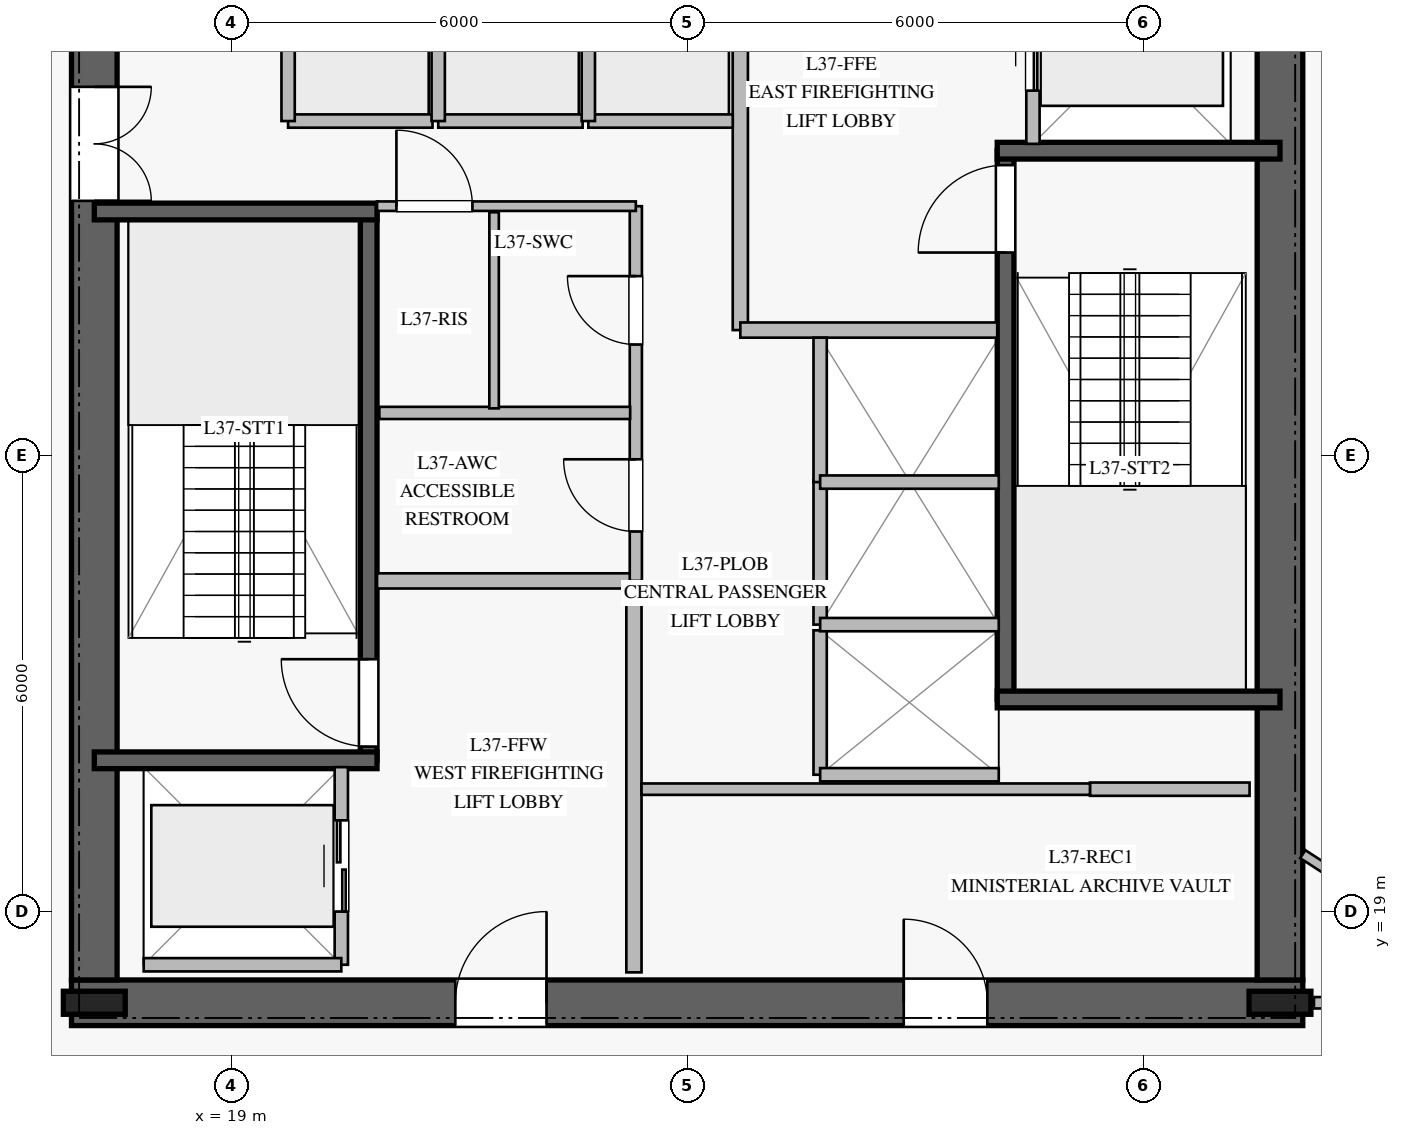
"""IFC4 building model, lengths in metres.
Left out: names, types, materials, properties, quantities, classifications, styles, units other than length and angle.
Written with IfcOpenShell. Run it as: python <this file> out.ifc"""

import sys

from ifc_helpers import new_model, si_unit, direction, frame, frame_2d, origin, origin_2d, place, context, subcontext, project, spatial, rectangle, i_section, extrude, element, fill, save


model = new_model("IFC4")
c1 = context("Model", 3, precision=1e-05, world=origin(), true_north=direction((0.0, 1.0)))
c2 = subcontext(c1, "Body", "Model", "MODEL_VIEW")
j1 = project(units=[si_unit("LENGTHUNIT", "METRE"), si_unit("PLANEANGLEUNIT", "RADIAN")], contexts=[c1])
p1 = place(None, origin())
s1 = spatial("IfcSite", under=j1, at=p1, CompositionType="ELEMENT")
p2 = place(p1, origin())
s2 = spatial("IfcBuilding", under=s1, at=p2, CompositionType="ELEMENT")
p3 = place(p2, frame((0.0, 0.0, 154.4)))
s3 = spatial("IfcBuildingStorey", under=s2, at=p3, CompositionType="ELEMENT", Elevation=154.4)
p4 = place(p3, frame((16.9, 17.8, 0.0), z_axis=(0.0, 0.0, 1.0), x_axis=(1.0, 0.0, 0.0)))
e1 = element("IfcWall", 1, at=p4, inside=s3, PredefinedType="SHEAR", context=c2, shape_type="SweptSolid", body=[
    extrude(rectangle(XDim=16.2, YDim=0.6, at=frame_2d((8.1, 0.0))), origin(), (0.0, 0.0, 1.0), 3.76),
])
p5 = place(p4, frame((5.05, 0.0, 0.0)))
e2 = element("IfcOpeningElement", 2, at=p5, cuts=e1, PredefinedType="OPENING", context=c2, shape_type="SweptSolid", body=[
    extrude(rectangle(XDim=1.2, YDim=2.25, at=frame_2d((0.6, 1.125))), frame((0.0, 0.31, 0.0), z_axis=(0.0, -1.0, 0.0), x_axis=(1.0, 0.0, 0.0)), (0.0, 0.0, 1.0), 0.62),
])
p6 = place(p4, frame((10.95, 0.0, 0.0)))
e3 = element("IfcOpeningElement", 3, at=p6, cuts=e1, PredefinedType="OPENING", context=c2, shape_type="SweptSolid", body=[
    extrude(rectangle(XDim=1.1, YDim=2.2, at=frame_2d((0.55, 1.1))), frame((0.0, 0.31, 0.0), z_axis=(0.0, -1.0, 0.0), x_axis=(1.0, 0.0, 0.0)), (0.0, 0.0, 1.0), 0.62),
])
p7 = place(p3, frame((17.2, 31.9, 0.0), z_axis=(0.0, 0.0, 1.0), x_axis=(0.0, -1.0, 0.0)))
e4 = element("IfcWall", 4, at=p7, inside=s3, PredefinedType="SHEAR", context=c2, shape_type="SweptSolid", body=[
    extrude(rectangle(XDim=13.8, YDim=0.6, at=frame_2d((6.9, 0.0))), origin(), (0.0, 0.0, 1.0), 3.76),
])
p8 = place(p7, frame((2.05, 0.0, 0.0)))
e5 = element("IfcOpeningElement", 5, at=p8, cuts=e4, PredefinedType="OPENING", context=c2, shape_type="SweptSolid", body=[
    extrude(rectangle(XDim=1.5, YDim=2.2, at=frame_2d((0.75, 1.1))), frame((0.0, 0.31, 0.0), z_axis=(0.0, -1.0, 0.0), x_axis=(1.0, 0.0, 0.0)), (0.0, 0.0, 1.0), 0.62),
])
p9 = place(p3, frame((32.8, 18.1, 0.0), z_axis=(0.0, 0.0, 1.0), x_axis=(0.0, 1.0, 0.0)))
e6 = element("IfcWall", 6, at=p9, inside=s3, PredefinedType="SHEAR", context=c2, shape_type="SweptSolid", body=[
    extrude(rectangle(XDim=13.8, YDim=0.6, at=frame_2d((6.9, 0.0))), origin(), (0.0, 0.0, 1.0), 3.76),
])
for number, where, z_axis, x_axis in (
    (7, (17.2, 17.8, 0.0), (0.0, 0.0, 1.0), (1.0, 0.0, 0.0)),
    (8, (32.8, 17.8, 0.0), (0.0, 0.0, 1.0), (1.0, 0.0, 0.0)),
):
    element("IfcColumn", number, at=place(p3, frame(where, z_axis=z_axis, x_axis=x_axis)), inside=s3, PredefinedType="COLUMN", context=c2, shape_type="SweptSolid", body=[
        extrude(i_section(OverallWidth=0.303, OverallDepth=0.814, WebThickness=0.021, FlangeThickness=0.04, at=origin_2d()), origin(), (0.0, 0.0, 1.0), 4.0),
    ])
p10 = place(p3, frame((20.81, 20.99, 0.0), z_axis=(0.0, 0.0, 1.0), x_axis=(0.0, 1.0, 0.0)))
e9 = element("IfcWall", 9, at=p10, inside=s3, PredefinedType="SOLIDWALL", context=c2, shape_type="SweptSolid", body=[
    extrude(rectangle(XDim=7.22, YDim=0.22, at=frame_2d((3.61, 0.0))), origin(), (0.0, 0.0, 1.0), 3.76),
])
p11 = place(p10, frame((0.18, 0.0, 0.0)))
e10 = element("IfcOpeningElement", 10, at=p11, cuts=e9, PredefinedType="OPENING", context=c2, shape_type="SweptSolid", body=[
    extrude(rectangle(XDim=1.15, YDim=2.2, at=frame_2d((0.575, 1.1))), frame((0.0, 0.12, 0.0), z_axis=(0.0, -1.0, 0.0), x_axis=(1.0, 0.0, 0.0)), (0.0, 0.0, 1.0), 0.24),
])
for number, where, z_axis, x_axis in (
    (11, (17.2, 20.99, 0.0), (0.0, 0.0, 1.0), (1.0, 0.0, 0.0)),
    (12, (17.2, 28.21, 0.0), (0.0, 0.0, 1.0), (1.0, 0.0, 0.0)),
):
    element("IfcWall", number, at=place(p3, frame(where, z_axis=z_axis, x_axis=x_axis)), inside=s3, PredefinedType="SOLIDWALL", context=c2, shape_type="SweptSolid", body=[
        extrude(rectangle(XDim=3.72, YDim=0.22, at=frame_2d((1.86, 0.0))), origin(), (0.0, 0.0, 1.0), 3.76),
    ])
p12 = place(p3, frame((29.19, 21.79, 0.0), z_axis=(0.0, 0.0, 1.0), x_axis=(0.0, 1.0, 0.0)))
e13 = element("IfcWall", 13, at=p12, inside=s3, PredefinedType="SOLIDWALL", context=c2, shape_type="SweptSolid", body=[
    extrude(rectangle(XDim=7.22, YDim=0.22, at=frame_2d((3.61, 0.0))), origin(), (0.0, 0.0, 1.0), 3.76),
])
p13 = place(p12, frame((5.88, 0.0, 0.0)))
e14 = element("IfcOpeningElement", 14, at=p13, cuts=e13, PredefinedType="OPENING", context=c2, shape_type="SweptSolid", body=[
    extrude(rectangle(XDim=1.15, YDim=2.2, at=frame_2d((0.575, 1.1))), frame((0.0, 0.12, 0.0), z_axis=(0.0, -1.0, 0.0), x_axis=(1.0, 0.0, 0.0)), (0.0, 0.0, 1.0), 0.24),
])
for number, where, z_axis, x_axis in (
    (15, (29.08, 21.79, 0.0), (0.0, 0.0, 1.0), (1.0, 0.0, 0.0)),
    (16, (29.08, 29.01, 0.0), (0.0, 0.0, 1.0), (1.0, 0.0, 0.0)),
):
    element("IfcWall", number, at=place(p3, frame(where, z_axis=z_axis, x_axis=x_axis)), inside=s3, PredefinedType="SOLIDWALL", context=c2, shape_type="SweptSolid", body=[
        extrude(rectangle(XDim=3.72, YDim=0.22, at=frame_2d((1.86, 0.0))), origin(), (0.0, 0.0, 1.0), 3.76),
    ])
p14 = place(p3, frame((24.3, 18.2, 0.0), z_axis=(0.0, 0.0, 1.0), x_axis=(0.0, 1.0, 0.0)))
e17 = element("IfcWall", 17, at=p14, inside=s3, PredefinedType="PARTITIONING", context=c2, shape_type="SweptSolid", body=[
    extrude(rectangle(XDim=5.15, YDim=0.2, at=frame_2d((2.575, 0.0))), origin(), (0.0, 0.0, 1.0), 3.76),
])
p15 = place(p3, frame((20.92, 23.35, 0.0), z_axis=(0.0, 0.0, 1.0), x_axis=(1.0, 0.0, 0.0)))
e18 = element("IfcWall", 18, at=p15, inside=s3, PredefinedType="PARTITIONING", context=c2, shape_type="SweptSolid", body=[
    extrude(rectangle(XDim=3.38, YDim=0.2, at=frame_2d((1.69, 0.0))), origin(), (0.0, 0.0, 1.0), 3.76),
])
p16 = place(p3, frame((25.7, 26.65, 0.0), z_axis=(0.0, 0.0, 1.0), x_axis=(0.0, 1.0, 0.0)))
e19 = element("IfcWall", 19, at=p16, inside=s3, PredefinedType="PARTITIONING", context=c2, shape_type="SweptSolid", body=[
    extrude(rectangle(XDim=5.15, YDim=0.2, at=frame_2d((2.575, 0.0))), origin(), (0.0, 0.0, 1.0), 3.76),
])
p17 = place(p3, frame((25.7, 26.65, 0.0), z_axis=(0.0, 0.0, 1.0), x_axis=(1.0, 0.0, 0.0)))
e20 = element("IfcWall", 20, at=p17, inside=s3, PredefinedType="PARTITIONING", context=c2, shape_type="SweptSolid", body=[
    extrude(rectangle(XDim=3.38, YDim=0.2, at=frame_2d((1.69, 0.0))), origin(), (0.0, 0.0, 1.0), 3.76),
])
p18 = place(p3, frame((24.325, 23.35, 0.0), z_axis=(0.0, 0.0, 1.0), x_axis=(0.0, 1.0, 0.0)))
e21 = element("IfcWall", 21, at=p18, inside=s3, PredefinedType="PLUMBINGWALL", context=c2, shape_type="SweptSolid", body=[
    extrude(rectangle(XDim=4.93, YDim=0.16, at=frame_2d((2.465, 0.0))), origin(), (0.0, 0.0, 1.0), 3.76),
])
p19 = place(p18, frame((0.65, 0.0, 0.0)))
e22 = element("IfcOpeningElement", 22, at=p19, cuts=e21, PredefinedType="OPENING", context=c2, shape_type="SweptSolid", body=[
    extrude(rectangle(XDim=0.95, YDim=2.1, at=frame_2d((0.475, 1.05))), frame((0.0, 0.09, 0.0), z_axis=(0.0, -1.0, 0.0), x_axis=(1.0, 0.0, 0.0)), (0.0, 0.0, 1.0), 0.18),
])
p20 = place(p18, frame((3.11, 0.0, 0.0)))
e23 = element("IfcOpeningElement", 23, at=p20, cuts=e21, PredefinedType="OPENING", context=c2, shape_type="SweptSolid", body=[
    extrude(rectangle(XDim=0.9, YDim=2.1, at=frame_2d((0.45, 1.05))), frame((0.0, 0.09, 0.0), z_axis=(0.0, -1.0, 0.0), x_axis=(1.0, 0.0, 0.0)), (0.0, 0.0, 1.0), 0.18),
])
p21 = place(p3, frame((20.92, 28.28, 0.0), z_axis=(0.0, 0.0, 1.0), x_axis=(1.0, 0.0, 0.0)))
e24 = element("IfcWall", 24, at=p21, inside=s3, PredefinedType="PARTITIONING", context=c2, shape_type="SweptSolid", body=[
    extrude(rectangle(XDim=3.405, YDim=0.125, at=frame_2d((1.703, 0.0))), origin(), (0.0, 0.0, 1.0), 3.76),
])
p22 = place(p21, frame((0.255, 0.0, 0.0)))
e25 = element("IfcOpeningElement", 25, at=p22, cuts=e24, PredefinedType="OPENING", context=c2, shape_type="SweptSolid", body=[
    extrude(rectangle(XDim=1.0, YDim=2.15, at=frame_2d((0.5, 1.075))), frame((0.0, 0.073, 0.0), z_axis=(0.0, -1.0, 0.0), x_axis=(1.0, 0.0, 0.0)), (0.0, 0.0, 1.0), 0.145),
])
p23 = place(p3, frame((20.95, 25.56, 0.0), z_axis=(0.0, 0.0, 1.0), x_axis=(1.0, 0.0, 0.0)))
e26 = element("IfcWall", 26, at=p23, inside=s3, PredefinedType="PLUMBINGWALL", context=c2, shape_type="SweptSolid", body=[
    extrude(rectangle(XDim=3.3, YDim=0.16, at=frame_2d((1.65, 0.0))), origin(), (0.0, 0.0, 1.0), 3.76),
])
p24 = place(p3, frame((22.46, 25.62, 0.0), z_axis=(0.0, 0.0, 1.0), x_axis=(0.0, 1.0, 0.0)))
e27 = element("IfcWall", 27, at=p24, inside=s3, PredefinedType="PARTITIONING", context=c2, shape_type="SweptSolid", body=[
    extrude(rectangle(XDim=2.58, YDim=0.125, at=frame_2d((1.29, 0.0))), origin(), (0.0, 0.0, 1.0), 3.76),
])
p25 = place(p3, frame((30.3, 20.61, 0.0), z_axis=(0.0, 0.0, 1.0), x_axis=(1.0, 0.0, 0.0)))
e28 = element("IfcWall", 28, at=p25, inside=s3, PredefinedType="PARTITIONING", context=c2, shape_type="SweptSolid", body=[
    extrude(rectangle(XDim=2.1, YDim=0.175, at=frame_2d((1.05, 0.0))), origin(), (0.0, 0.0, 1.0), 3.76),
])
p26 = place(p3, frame((24.4, 20.61, 0.0), z_axis=(0.0, 0.0, 1.0), x_axis=(1.0, 0.0, 0.0)))
e29 = element("IfcWall", 29, at=p26, inside=s3, PredefinedType="PARTITIONING", context=c2, shape_type="SweptSolid", body=[
    extrude(rectangle(XDim=5.9, YDim=0.15, at=frame_2d((2.95, 0.0))), origin(), (0.0, 0.0, 1.0), 3.76),
])
p27 = place(p3, frame((19.75, 29.4, 0.0), z_axis=(0.0, 0.0, 1.0), x_axis=(1.0, 0.0, 0.0)))
e30 = element("IfcWall", 30, at=p27, inside=s3, PredefinedType="PARTITIONING", context=c2, shape_type="SweptSolid", body=[
    extrude(rectangle(XDim=1.9, YDim=0.175, at=frame_2d((0.95, 0.0))), origin(), (0.0, 0.0, 1.0), 3.76),
])
p28 = place(p3, frame((19.75, 29.4, 0.0), z_axis=(0.0, 0.0, 1.0), x_axis=(0.0, 1.0, 0.0)))
e31 = element("IfcWall", 31, at=p28, inside=s3, PredefinedType="PARTITIONING", context=c2, shape_type="SweptSolid", body=[
    extrude(rectangle(XDim=2.35, YDim=0.175, at=frame_2d((1.175, 0.0))), origin(), (0.0, 0.0, 1.0), 3.76),
])
p29 = place(p3, frame((21.725, 29.4, 0.0), z_axis=(0.0, 0.0, 1.0), x_axis=(1.0, 0.0, 0.0)))
e32 = element("IfcWall", 32, at=p29, inside=s3, PredefinedType="PARTITIONING", context=c2, shape_type="SweptSolid", body=[
    extrude(rectangle(XDim=1.9, YDim=0.175, at=frame_2d((0.95, 0.0))), origin(), (0.0, 0.0, 1.0), 3.76),
])
p30 = place(p3, frame((21.725, 29.4, 0.0), z_axis=(0.0, 0.0, 1.0), x_axis=(0.0, 1.0, 0.0)))
e33 = element("IfcWall", 33, at=p30, inside=s3, PredefinedType="PARTITIONING", context=c2, shape_type="SweptSolid", body=[
    extrude(rectangle(XDim=2.35, YDim=0.175, at=frame_2d((1.175, 0.0))), origin(), (0.0, 0.0, 1.0), 3.76),
])
p31 = place(p3, frame((23.7, 29.4, 0.0), z_axis=(0.0, 0.0, 1.0), x_axis=(1.0, 0.0, 0.0)))
e34 = element("IfcWall", 34, at=p31, inside=s3, PredefinedType="PARTITIONING", context=c2, shape_type="SweptSolid", body=[
    extrude(rectangle(XDim=1.9, YDim=0.175, at=frame_2d((0.95, 0.0))), origin(), (0.0, 0.0, 1.0), 3.76),
])
p32 = place(p3, frame((23.7, 29.4, 0.0), z_axis=(0.0, 0.0, 1.0), x_axis=(0.0, 1.0, 0.0)))
e35 = element("IfcWall", 35, at=p32, inside=s3, PredefinedType="PARTITIONING", context=c2, shape_type="SweptSolid", body=[
    extrude(rectangle(XDim=2.35, YDim=0.175, at=frame_2d((1.175, 0.0))), origin(), (0.0, 0.0, 1.0), 3.76),
])
p33 = place(p3, frame((26.75, 20.8, 0.0), z_axis=(0.0, 0.0, 1.0), x_axis=(0.0, 1.0, 0.0)))
e36 = element("IfcWall", 36, at=p33, inside=s3, PredefinedType="PARTITIONING", context=c2, shape_type="SweptSolid", body=[
    extrude(rectangle(XDim=1.9, YDim=0.175, at=frame_2d((0.95, 0.0))), origin(), (0.0, 0.0, 1.0), 3.76),
])
p34 = place(p3, frame((26.75, 20.8, 0.0), z_axis=(0.0, 0.0, 1.0), x_axis=(1.0, 0.0, 0.0)))
e37 = element("IfcWall", 37, at=p34, inside=s3, PredefinedType="PARTITIONING", context=c2, shape_type="SweptSolid", body=[
    extrude(rectangle(XDim=2.35, YDim=0.175, at=frame_2d((1.175, 0.0))), origin(), (0.0, 0.0, 1.0), 3.76),
])
p35 = place(p3, frame((26.75, 22.775, 0.0), z_axis=(0.0, 0.0, 1.0), x_axis=(0.0, 1.0, 0.0)))
e38 = element("IfcWall", 38, at=p35, inside=s3, PredefinedType="PARTITIONING", context=c2, shape_type="SweptSolid", body=[
    extrude(rectangle(XDim=1.9, YDim=0.175, at=frame_2d((0.95, 0.0))), origin(), (0.0, 0.0, 1.0), 3.76),
])
p36 = place(p3, frame((26.75, 22.775, 0.0), z_axis=(0.0, 0.0, 1.0), x_axis=(1.0, 0.0, 0.0)))
e39 = element("IfcWall", 39, at=p36, inside=s3, PredefinedType="PARTITIONING", context=c2, shape_type="SweptSolid", body=[
    extrude(rectangle(XDim=2.35, YDim=0.175, at=frame_2d((1.175, 0.0))), origin(), (0.0, 0.0, 1.0), 3.76),
])
p37 = place(p3, frame((26.75, 24.65, 0.0), z_axis=(0.0, 0.0, 1.0), x_axis=(0.0, 1.0, 0.0)))
e40 = element("IfcWall", 40, at=p37, inside=s3, PredefinedType="PARTITIONING", context=c2, shape_type="SweptSolid", body=[
    extrude(rectangle(XDim=1.9, YDim=0.175, at=frame_2d((0.95, 0.0))), origin(), (0.0, 0.0, 1.0), 3.76),
])
p38 = place(p3, frame((26.75, 24.65, 0.0), z_axis=(0.0, 0.0, 1.0), x_axis=(1.0, 0.0, 0.0)))
e41 = element("IfcWall", 41, at=p38, inside=s3, PredefinedType="PARTITIONING", context=c2, shape_type="SweptSolid", body=[
    extrude(rectangle(XDim=2.35, YDim=0.175, at=frame_2d((1.175, 0.0))), origin(), (0.0, 0.0, 1.0), 3.76),
])
p39 = place(p3, frame((20.45, 18.3, 0.0), z_axis=(0.0, 0.0, 1.0), x_axis=(0.0, 1.0, 0.0)))
e42 = element("IfcWall", 42, at=p39, inside=s3, PredefinedType="PARTITIONING", context=c2, shape_type="SweptSolid", body=[
    extrude(rectangle(XDim=2.6, YDim=0.175, at=frame_2d((1.3, 0.0))), origin(), (0.0, 0.0, 1.0), 3.76),
])
p40 = place(p39, frame((0.7, 0.0, 0.0)))
e43 = element("IfcOpeningElement", 43, at=p40, cuts=e42, PredefinedType="OPENING", context=c2, shape_type="SweptSolid", body=[
    extrude(rectangle(XDim=1.2, YDim=2.2, at=frame_2d((0.6, 1.1))), frame((0.0, 0.098, 0.0), z_axis=(0.0, -1.0, 0.0), x_axis=(1.0, 0.0, 0.0)), (0.0, 0.0, 1.0), 0.195),
])
p41 = place(p3, frame((17.85, 18.3, 0.0), z_axis=(0.0, 0.0, 1.0), x_axis=(1.0, 0.0, 0.0)))
e44 = element("IfcWall", 44, at=p41, inside=s3, PredefinedType="PARTITIONING", context=c2, shape_type="SweptSolid", body=[
    extrude(rectangle(XDim=2.6, YDim=0.175, at=frame_2d((1.3, 0.0))), origin(), (0.0, 0.0, 1.0), 3.76),
])
p42 = place(p3, frame((29.55, 29.1, 0.0), z_axis=(0.0, 0.0, 1.0), x_axis=(0.0, 1.0, 0.0)))
e45 = element("IfcWall", 45, at=p42, inside=s3, PredefinedType="PARTITIONING", context=c2, shape_type="SweptSolid", body=[
    extrude(rectangle(XDim=2.6, YDim=0.175, at=frame_2d((1.3, 0.0))), origin(), (0.0, 0.0, 1.0), 3.76),
])
p43 = place(p42, frame((0.7, 0.0, 0.0)))
e46 = element("IfcOpeningElement", 46, at=p43, cuts=e45, PredefinedType="OPENING", context=c2, shape_type="SweptSolid", body=[
    extrude(rectangle(XDim=1.2, YDim=2.2, at=frame_2d((0.6, 1.1))), frame((0.0, 0.098, 0.0), z_axis=(0.0, -1.0, 0.0), x_axis=(1.0, 0.0, 0.0)), (0.0, 0.0, 1.0), 0.195),
])
p44 = place(p3, frame((33.247, 17.8, 0.0), z_axis=(0.0, 0.0, 1.0), x_axis=(1.0, 0.0, 0.0)))
e47 = element("IfcWall", 47, at=p44, inside=s3, PredefinedType="PARTITIONING", context=c2, shape_type="SweptSolid", body=[
    extrude(rectangle(XDim=7.953, YDim=0.15, at=frame_2d((3.977, 0.0))), origin(), (0.0, 0.0, 1.0), 3.21),
])
p45 = place(p3, frame((33.1, 19.755, 0.0), z_axis=(0.0, 0.0, 1.0), x_axis=(0.839380694324, -0.543543972459, 0.0)))
e48 = element("IfcWall", 48, at=p45, inside=s3, PredefinedType="PARTITIONING", context=c2, shape_type="SweptSolid", body=[
    extrude(rectangle(XDim=3.596, YDim=0.125, at=frame_2d((1.798, 0.0))), origin(), (0.0, 0.0, 1.0), 3.21),
])
p46 = place(p11, origin())
e49 = element("IfcDoor", 49, at=p46, inside=s3, OperationType="SINGLE_SWING_RIGHT", PredefinedType="DOOR", context=c2, shape_type="SweptSolid", body=[
    extrude(rectangle(XDim=1.15, YDim=2.2, at=frame_2d((0.575, 1.1))), frame((0.0, 0.025, 0.0), z_axis=(0.0, -1.0, 0.0), x_axis=(1.0, 0.0, 0.0)), (0.0, 0.0, 1.0), 0.05),
])
fill(e10, e49)
p47 = place(p13, origin())
e50 = element("IfcDoor", 50, at=p47, inside=s3, OperationType="SINGLE_SWING_LEFT", PredefinedType="DOOR", context=c2, shape_type="SweptSolid", body=[
    extrude(rectangle(XDim=1.15, YDim=2.2, at=frame_2d((0.575, 1.1))), frame((0.0, 0.025, 0.0), z_axis=(0.0, -1.0, 0.0), x_axis=(1.0, 0.0, 0.0)), (0.0, 0.0, 1.0), 0.05),
])
fill(e14, e50)
p48 = place(p5, origin())
e51 = element("IfcDoor", 51, at=p48, inside=s3, OperationType="SINGLE_SWING_RIGHT", PredefinedType="DOOR", context=c2, shape_type="SweptSolid", body=[
    extrude(rectangle(XDim=1.2, YDim=2.25, at=frame_2d((0.6, 1.125))), frame((0.0, 0.025, 0.0), z_axis=(0.0, -1.0, 0.0), x_axis=(1.0, 0.0, 0.0)), (0.0, 0.0, 1.0), 0.05),
])
fill(e2, e51)
p49 = place(p8, origin())
e52 = element("IfcDoor", 52, at=p49, inside=s3, OperationType="DOUBLE_DOOR_SINGLE_SWING", PredefinedType="DOOR", context=c2, shape_type="SweptSolid", body=[
    extrude(rectangle(XDim=1.5, YDim=2.2, at=frame_2d((0.75, 1.1))), frame((0.0, 0.025, 0.0), z_axis=(0.0, -1.0, 0.0), x_axis=(1.0, 0.0, 0.0)), (0.0, 0.0, 1.0), 0.05),
])
fill(e5, e52)
p50 = place(p19, origin())
e53 = element("IfcDoor", 53, at=p50, inside=s3, OperationType="SINGLE_SWING_RIGHT", PredefinedType="DOOR", context=c2, shape_type="SweptSolid", body=[
    extrude(rectangle(XDim=0.95, YDim=2.1, at=frame_2d((0.475, 1.05))), frame((0.0, 0.025, 0.0), z_axis=(0.0, -1.0, 0.0), x_axis=(1.0, 0.0, 0.0)), (0.0, 0.0, 1.0), 0.05),
])
fill(e22, e53)
p51 = place(p22, origin())
e54 = element("IfcDoor", 54, at=p51, inside=s3, OperationType="SINGLE_SWING_LEFT", PredefinedType="DOOR", context=c2, shape_type="SweptSolid", body=[
    extrude(rectangle(XDim=1.0, YDim=2.15, at=frame_2d((0.5, 1.075))), frame((0.0, 0.025, 0.0), z_axis=(0.0, -1.0, 0.0), x_axis=(1.0, 0.0, 0.0)), (0.0, 0.0, 1.0), 0.05),
])
fill(e25, e54)
p52 = place(p20, origin())
e55 = element("IfcDoor", 55, at=p52, inside=s3, OperationType="SINGLE_SWING_RIGHT", PredefinedType="DOOR", context=c2, shape_type="SweptSolid", body=[
    extrude(rectangle(XDim=0.9, YDim=2.1, at=frame_2d((0.45, 1.05))), frame((0.0, 0.025, 0.0), z_axis=(0.0, -1.0, 0.0), x_axis=(1.0, 0.0, 0.0)), (0.0, 0.0, 1.0), 0.05),
])
fill(e23, e55)
p53 = place(p6, origin())
e56 = element("IfcDoor", 56, at=p53, inside=s3, OperationType="SINGLE_SWING_LEFT", PredefinedType="DOOR", context=c2, shape_type="SweptSolid", body=[
    extrude(rectangle(XDim=1.1, YDim=2.2, at=frame_2d((0.55, 1.1))), frame((0.0, 0.025, 0.0), z_axis=(0.0, -1.0, 0.0), x_axis=(1.0, 0.0, 0.0)), (0.0, 0.0, 1.0), 0.05),
])
fill(e3, e56)
p54 = place(p40, origin())
e57 = element("IfcDoor", 57, at=p54, inside=s3, OperationType="DOUBLE_DOOR_SLIDING", PredefinedType="DOOR", context=c2, shape_type="SweptSolid", body=[
    extrude(rectangle(XDim=1.2, YDim=2.2, at=frame_2d((0.6, 1.1))), frame((0.0, 0.025, 0.0), z_axis=(0.0, -1.0, 0.0), x_axis=(1.0, 0.0, 0.0)), (0.0, 0.0, 1.0), 0.05),
])
fill(e43, e57)
p55 = place(p43, origin())
e58 = element("IfcDoor", 58, at=p55, inside=s3, OperationType="DOUBLE_DOOR_SLIDING", PredefinedType="DOOR", context=c2, shape_type="SweptSolid", body=[
    extrude(rectangle(XDim=1.2, YDim=2.2, at=frame_2d((0.6, 1.1))), frame((0.0, 0.025, 0.0), z_axis=(0.0, -1.0, 0.0), x_axis=(1.0, 0.0, 0.0)), (0.0, 0.0, 1.0), 0.05),
])
fill(e46, e58)
save(model, sys.argv[1])
